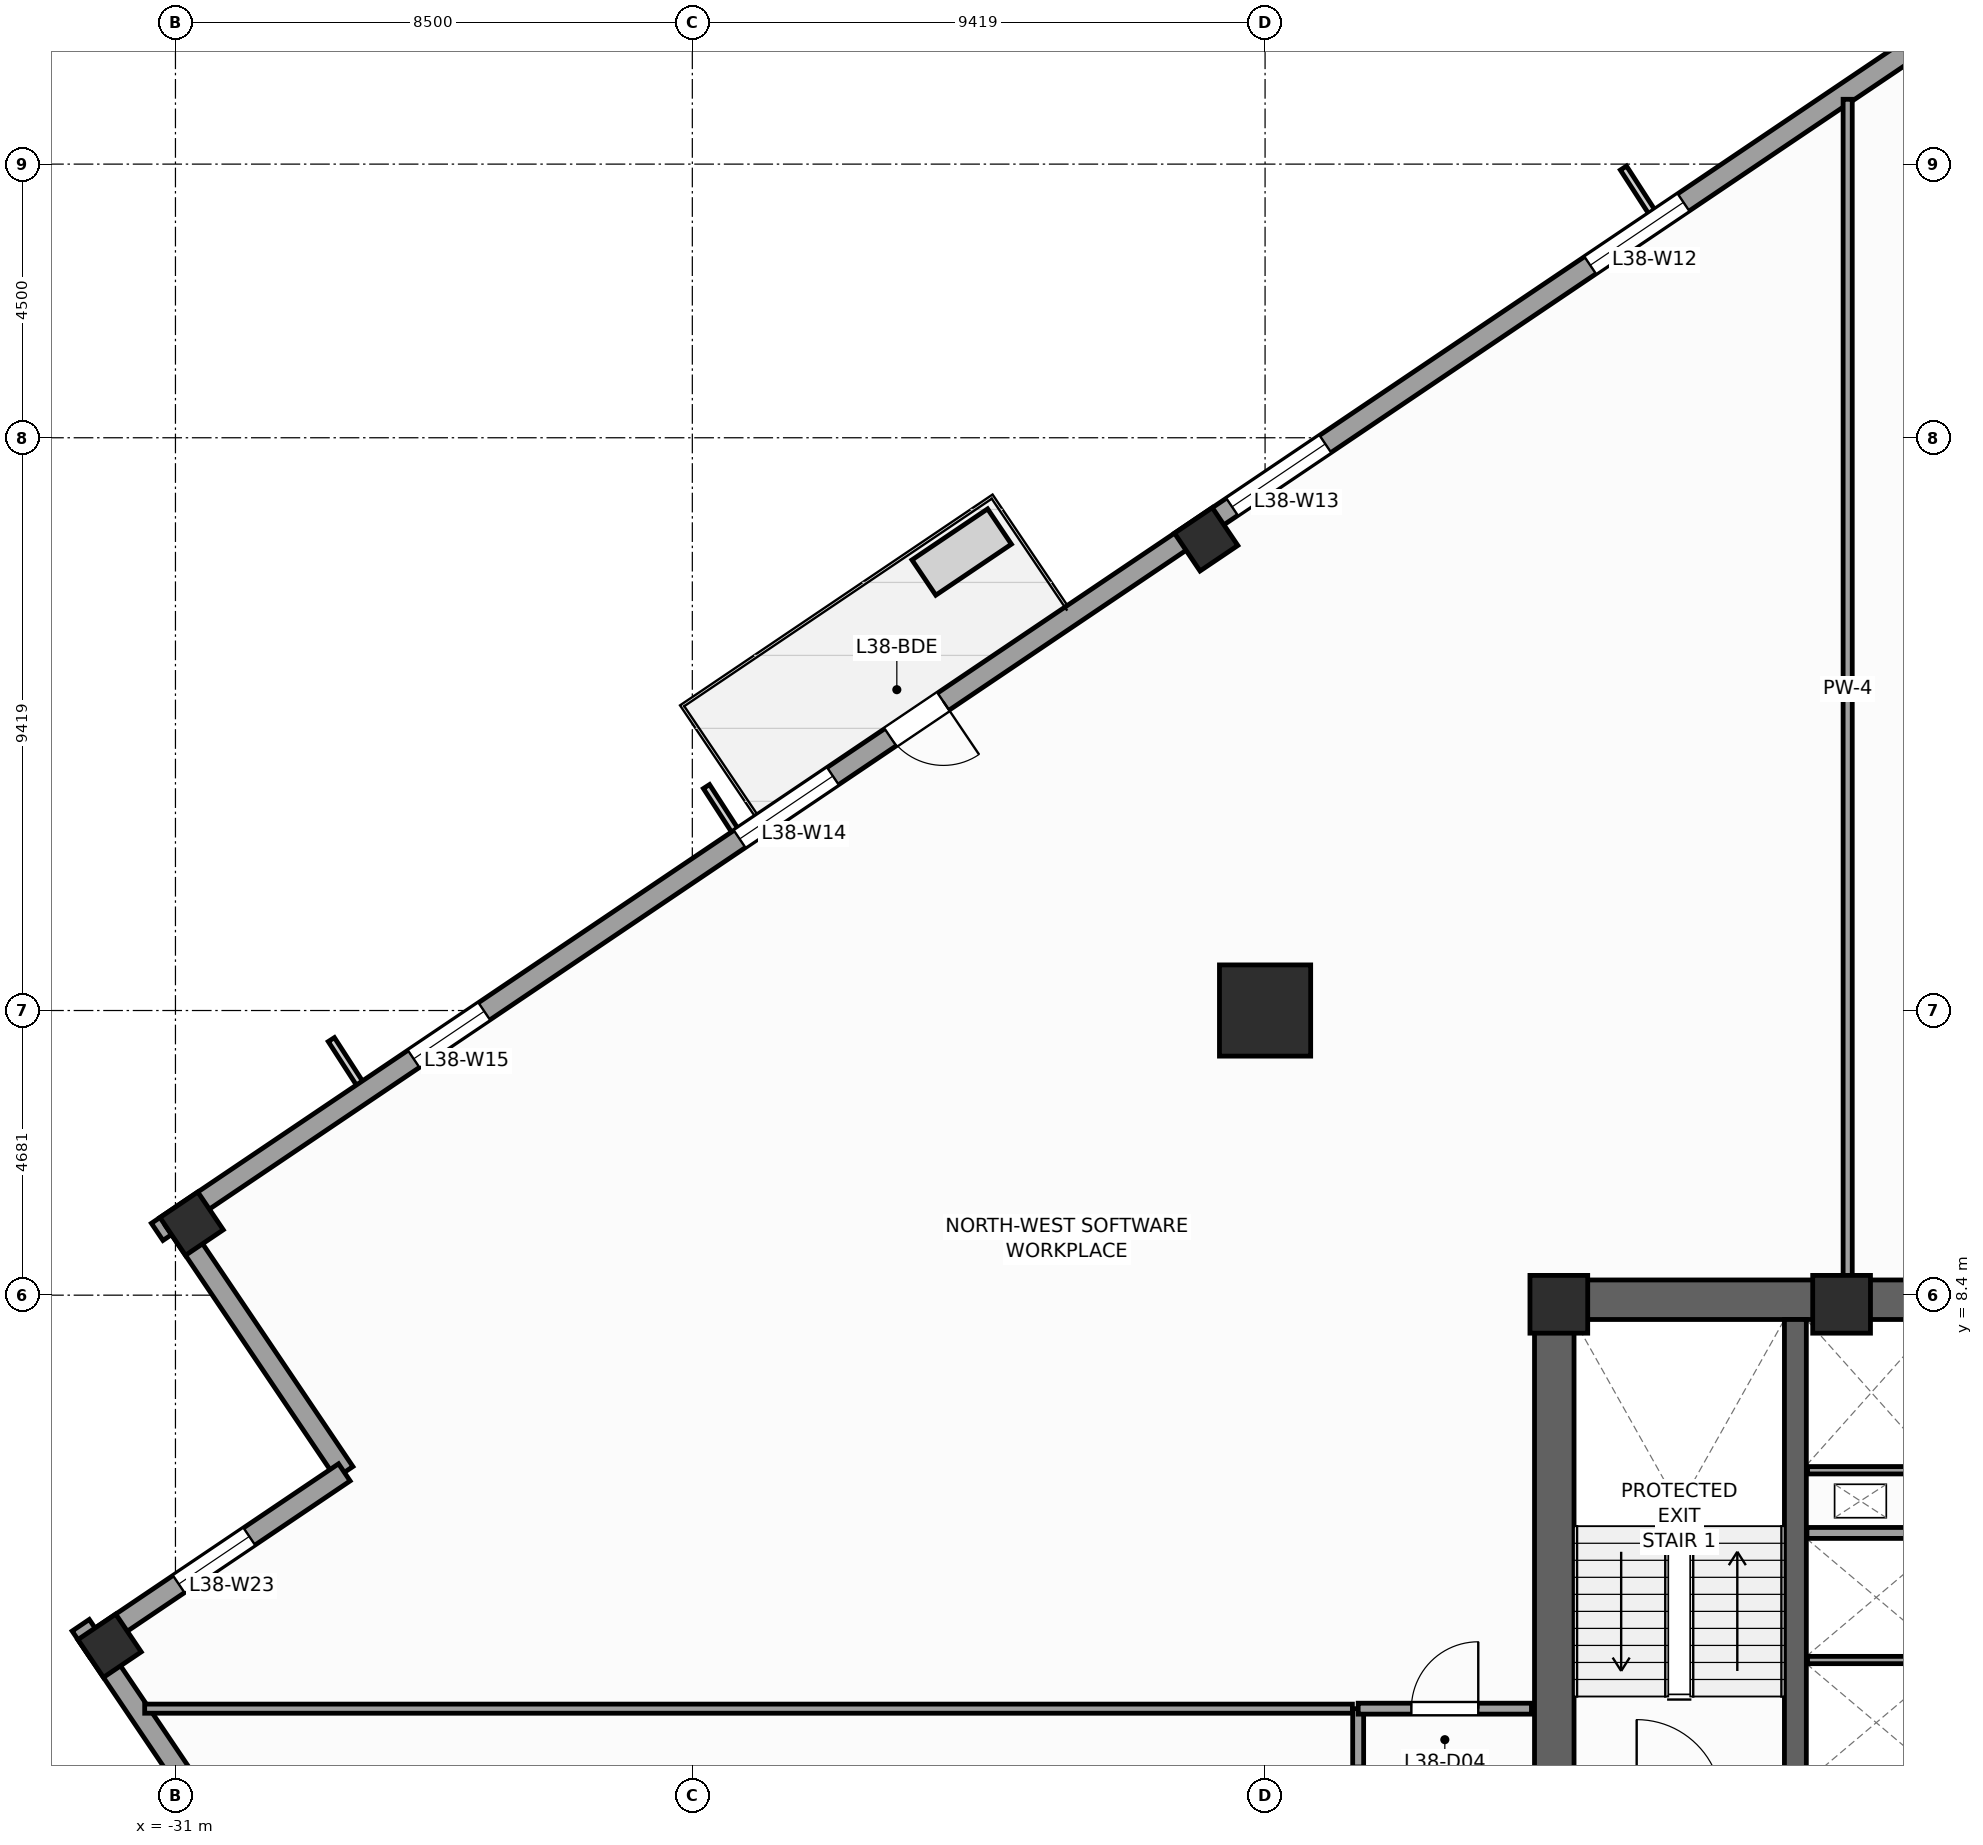
"""IFC4 building model, lengths in metres.
Left out: names, types, materials, properties, quantities, classifications, styles, units other than length and angle.
Written with IfcOpenShell. Run it as: python <this file> out.ifc"""

import sys

from ifc_helpers import new_model, si_unit, direction, frame, frame_2d, origin, origin_2d, place, context, subcontext, project, spatial, rectangle, extrude, source, transform, mapped, element, fill, save


model = new_model("IFC4")
c1 = context("Model", 3, precision=1e-05, world=origin(), true_north=direction((0.0, 1.0)))
c2 = subcontext(c1, "Body", "Model", "MODEL_VIEW")
j1 = project(units=[si_unit("LENGTHUNIT", "METRE"), si_unit("PLANEANGLEUNIT", "RADIAN")], contexts=[c1])
p1 = place(None, origin())
s1 = spatial("IfcSite", under=j1, at=p1, CompositionType="ELEMENT")
p2 = place(p1, origin())
s2 = spatial("IfcBuilding", under=s1, at=p2, CompositionType="ELEMENT")
p3 = place(p2, frame((0.0, 0.0, 160.4)))
s3 = spatial("IfcBuildingStorey", under=s2, at=p3, CompositionType="ELEMENT", Elevation=160.4)
p4 = place(p3, frame((-8.65, 8.325, 0.0), z_axis=(0.0, 0.0, 1.0), x_axis=(1.0, 0.0, 0.0)))
e1 = element("IfcWall", 1, at=p4, inside=s3, PredefinedType="SHEAR", context=c2, shape_type="SweptSolid", body=[
    extrude(rectangle(XDim=17.3, YDim=0.65, at=frame_2d((8.65, 0.0))), origin(), (0.0, 0.0, 1.0), 4.0),
])
p5 = place(p3, frame((-8.325, -8.0, 0.0), z_axis=(0.0, 0.0, 1.0), x_axis=(0.0, 1.0, 0.0)))
e2 = element("IfcWall", 2, at=p5, inside=s3, PredefinedType="SHEAR", context=c2, shape_type="SweptSolid", body=[
    extrude(rectangle(XDim=16.0, YDim=0.65, at=frame_2d((8.0, 0.0))), origin(), (0.0, 0.0, 1.0), 4.0),
])
p6 = place(p5, frame((4.69, 0.0, 0.0)))
e3 = element("IfcOpeningElement", 3, at=p6, cuts=e2, PredefinedType="OPENING", context=c2, shape_type="SweptSolid", body=[
    extrude(rectangle(XDim=1.3, YDim=2.2, at=frame_2d((0.65, 1.1))), frame((0.0, 0.335, 0.0), z_axis=(0.0, -1.0, 0.0), x_axis=(1.0, 0.0, 0.0)), (0.0, 0.0, 1.0), 0.67),
])
p7 = place(p3, frame((-4.36, -8.0, 0.0), z_axis=(0.0, 0.0, 1.0), x_axis=(0.0, 1.0, 0.0)))
e4 = element("IfcWall", 4, at=p7, inside=s3, PredefinedType="SHEAR", context=c2, shape_type="SweptSolid", body=[
    extrude(rectangle(XDim=16.0, YDim=0.36, at=frame_2d((8.0, 0.0))), origin(), (0.0, 0.0, 1.0), 4.0),
])
m1 = source(origin(), c2, "Body", "SweptSolid", [
    extrude(rectangle(XDim=0.95, YDim=0.95, at=origin_2d()), origin(), (0.0, 0.0, 1.0), 4.0),
])
for number, where, z_axis, x_axis in (
    (5, (-8.25, 8.25, 0.0), (0.0, 0.0, 1.0), (1.0, 0.0, 0.0)),
    (6, (-3.6, 8.25, 0.0), (0.0, 0.0, 1.0), (1.0, 0.0, 0.0)),
):
    element("IfcColumn", number, at=place(p3, frame(where, z_axis=z_axis, x_axis=x_axis)), inside=s3, PredefinedType="PILASTER", context=c2, shape_type="MappedRepresentation", body=[
        mapped(m1, transform((0.0, 0.0, 0.0), scale=1.0)),
    ])
m2 = source(origin(), c2, "Body", "SweptSolid", [
    extrude(rectangle(XDim=1.5, YDim=1.5, at=origin_2d()), origin(), (0.0, 0.0, 1.0), 4.0),
])
p8 = place(p3, frame((-13.081, 13.081, 0.0), z_axis=(0.0, 0.0, 1.0), x_axis=(1.0, 0.0, 0.0)))
e7 = element("IfcColumn", 7, at=p8, inside=s3, PredefinedType="COLUMN", context=c2, shape_type="MappedRepresentation", body=[
    mapped(m2, transform((0.0, 0.0, 0.0), scale=1.0)),
])
m3 = source(origin(), c2, "Body", "SweptSolid", [
    extrude(rectangle(XDim=0.75, YDim=0.75, at=origin_2d()), origin(), (0.0, 0.0, 1.0), 4.0),
])
for number, where, z_axis, x_axis in (
    (8, (-14.05, 20.83, 0.0), (0.0, 0.0, 1.0), (0.829, 0.559, 0.0)),
    (9, (-30.734, 9.576, 0.0), (0.0, 0.0, 1.0), (0.829, 0.559, 0.0)),
    (10, (-32.083, 2.635, 0.0), (0.0, 0.0, 1.0), (0.829, 0.559, 0.0)),
):
    element("IfcColumn", number, at=place(p3, frame(where, z_axis=z_axis, x_axis=x_axis)), inside=s3, PredefinedType="COLUMN", context=c2, shape_type="MappedRepresentation", body=[
        mapped(m3, transform((0.0, 0.0, 0.0), scale=1.0)),
    ])
p9 = place(p3, frame((2.972, 32.558, 0.0), z_axis=(0.0, 0.0, 1.0), x_axis=(-0.829036218961, -0.559194910251, 0.0)))
e11 = element("IfcWall", 11, at=p9, inside=s3, PredefinedType="STANDARD", context=c2, shape_type="SweptSolid", body=[
    extrude(rectangle(XDim=41.34, YDim=0.34, at=frame_2d((20.67, 0.0))), origin(), (0.0, 0.0, 1.0), 3.04),
])
p10 = place(p9, frame((25.745, 0.0, 0.0)))
e12 = element("IfcOpeningElement", 12, at=p10, cuts=e11, PredefinedType="OPENING", context=c2, shape_type="SweptSolid", body=[
    extrude(rectangle(XDim=1.05, YDim=2.25, at=frame_2d((0.525, 1.125))), frame((0.0, 0.18, 0.0), z_axis=(0.0, -1.0, 0.0), x_axis=(1.0, 0.0, 0.0)), (0.0, 0.0, 1.0), 0.36),
])
p11 = place(p9, frame((4.261, 0.0, 0.56)))
e13 = element("IfcOpeningElement", 13, at=p11, cuts=e11, PredefinedType="OPENING", context=c2, shape_type="SweptSolid", body=[
    extrude(rectangle(XDim=1.4, YDim=2.4, at=frame_2d((0.7, 1.2))), frame((0.0, 0.18, 0.0), z_axis=(0.0, -1.0, 0.0), x_axis=(1.0, 0.0, 0.0)), (0.0, 0.0, 1.0), 0.36),
])
p12 = place(p9, frame((11.064, 0.0, 0.61)))
e14 = element("IfcOpeningElement", 14, at=p12, cuts=e11, PredefinedType="OPENING", context=c2, shape_type="SweptSolid", body=[
    extrude(rectangle(XDim=1.85, YDim=2.35, at=frame_2d((0.925, 1.175))), frame((0.0, 0.18, 0.0), z_axis=(0.0, -1.0, 0.0), x_axis=(1.0, 0.0, 0.0)), (0.0, 0.0, 1.0), 0.36),
])
p13 = place(p9, frame((18.168, 0.0, 0.61)))
e15 = element("IfcOpeningElement", 15, at=p13, cuts=e11, PredefinedType="OPENING", context=c2, shape_type="SweptSolid", body=[
    extrude(rectangle(XDim=1.85, YDim=2.35, at=frame_2d((0.925, 1.175))), frame((0.0, 0.18, 0.0), z_axis=(0.0, -1.0, 0.0), x_axis=(1.0, 0.0, 0.0)), (0.0, 0.0, 1.0), 0.36),
])
p14 = place(p9, frame((27.936, 0.0, 0.61)))
e16 = element("IfcOpeningElement", 16, at=p14, cuts=e11, PredefinedType="OPENING", context=c2, shape_type="SweptSolid", body=[
    extrude(rectangle(XDim=1.85, YDim=2.35, at=frame_2d((0.925, 1.175))), frame((0.0, 0.18, 0.0), z_axis=(0.0, -1.0, 0.0), x_axis=(1.0, 0.0, 0.0)), (0.0, 0.0, 1.0), 0.36),
])
p15 = place(p9, frame((34.852, 0.0, 0.56)))
e17 = element("IfcOpeningElement", 17, at=p15, cuts=e11, PredefinedType="OPENING", context=c2, shape_type="SweptSolid", body=[
    extrude(rectangle(XDim=1.4, YDim=2.4, at=frame_2d((0.7, 1.2))), frame((0.0, 0.18, 0.0), z_axis=(0.0, -1.0, 0.0), x_axis=(1.0, 0.0, 0.0)), (0.0, 0.0, 1.0), 0.36),
])
p16 = place(p3, frame((-31.019, 9.631, 0.0), z_axis=(0.0, 0.0, 1.0), x_axis=(0.559210350234, -0.829025804298, 0.0)))
e18 = element("IfcWall", 18, at=p16, inside=s3, PredefinedType="STANDARD", context=c2, shape_type="SweptSolid", body=[
    extrude(rectangle(XDim=5.0, YDim=0.34, at=frame_2d((2.5, 0.0))), origin(), (0.0, 0.0, 1.0), 3.74),
])
p17 = place(p3, frame((-28.223, 5.486, 0.0), z_axis=(0.0, 0.0, 1.0), x_axis=(-0.82905227345, -0.559171107879, 0.0)))
e19 = element("IfcWall", 19, at=p17, inside=s3, PredefinedType="STANDARD", context=c2, shape_type="SweptSolid", body=[
    extrude(rectangle(XDim=5.17, YDim=0.34, at=frame_2d((2.585, 0.0))), origin(), (0.0, 0.0, 1.0), 3.04),
])
p18 = place(p17, frame((1.885, 0.0, 0.56)))
e20 = element("IfcOpeningElement", 20, at=p18, cuts=e19, PredefinedType="OPENING", context=c2, shape_type="SweptSolid", body=[
    extrude(rectangle(XDim=1.4, YDim=2.4, at=frame_2d((0.7, 1.2))), frame((0.0, 0.18, 0.0), z_axis=(0.0, -1.0, 0.0), x_axis=(1.0, 0.0, 0.0)), (0.0, 0.0, 1.0), 0.36),
])
p19 = place(p3, frame((-32.558, 2.972, 0.0), z_axis=(0.0, 0.0, 1.0), x_axis=(0.559194910251, -0.829036218961, 0.0)))
e21 = element("IfcWall", 21, at=p19, inside=s3, PredefinedType="STANDARD", context=c2, shape_type="SweptSolid", body=[
    extrude(rectangle(XDim=41.34, YDim=0.34, at=frame_2d((20.67, 0.0))), origin(), (0.0, 0.0, 1.0), 3.04),
])
p20 = place(p19, frame((5.761, 0.0, 0.56)))
e22 = element("IfcOpeningElement", 22, at=p20, cuts=e21, PredefinedType="OPENING", context=c2, shape_type="SweptSolid", body=[
    extrude(rectangle(XDim=1.4, YDim=2.4, at=frame_2d((0.7, 1.2))), frame((0.0, 0.18, 0.0), z_axis=(0.0, -1.0, 0.0), x_axis=(1.0, 0.0, 0.0)), (0.0, 0.0, 1.0), 0.36),
])
p21 = place(p19, frame((11.064, 0.0, 0.61)))
e23 = element("IfcOpeningElement", 23, at=p21, cuts=e21, PredefinedType="OPENING", context=c2, shape_type="SweptSolid", body=[
    extrude(rectangle(XDim=1.85, YDim=2.35, at=frame_2d((0.925, 1.175))), frame((0.0, 0.18, 0.0), z_axis=(0.0, -1.0, 0.0), x_axis=(1.0, 0.0, 0.0)), (0.0, 0.0, 1.0), 0.36),
])
p22 = place(p19, frame((18.168, 0.0, 0.61)))
e24 = element("IfcOpeningElement", 24, at=p22, cuts=e21, PredefinedType="OPENING", context=c2, shape_type="SweptSolid", body=[
    extrude(rectangle(XDim=1.85, YDim=2.35, at=frame_2d((0.925, 1.175))), frame((0.0, 0.18, 0.0), z_axis=(0.0, -1.0, 0.0), x_axis=(1.0, 0.0, 0.0)), (0.0, 0.0, 1.0), 0.36),
])
p23 = place(p19, frame((27.186, 0.0, 0.61)))
e25 = element("IfcOpeningElement", 25, at=p23, cuts=e21, PredefinedType="OPENING", context=c2, shape_type="SweptSolid", body=[
    extrude(rectangle(XDim=1.85, YDim=2.35, at=frame_2d((0.925, 1.175))), frame((0.0, 0.18, 0.0), z_axis=(0.0, -1.0, 0.0), x_axis=(1.0, 0.0, 0.0)), (0.0, 0.0, 1.0), 0.36),
])
p24 = place(p19, frame((35.602, 0.0, 0.56)))
e26 = element("IfcOpeningElement", 26, at=p24, cuts=e21, PredefinedType="OPENING", context=c2, shape_type="SweptSolid", body=[
    extrude(rectangle(XDim=1.4, YDim=2.4, at=frame_2d((0.7, 1.2))), frame((0.0, 0.18, 0.0), z_axis=(0.0, -1.0, 0.0), x_axis=(1.0, 0.0, 0.0)), (0.0, 0.0, 1.0), 0.36),
])
p25 = place(p3, frame((-4.17, 4.49, 0.0), z_axis=(0.0, 0.0, 1.0), x_axis=(1.0, 0.0, 0.0)))
e27 = element("IfcWall", 27, at=p25, inside=s3, PredefinedType="PARTITIONING", context=c2, shape_type="SweptSolid", body=[
    extrude(rectangle(XDim=2.28, YDim=0.18, at=frame_2d((1.14, 0.0))), origin(), (0.0, 0.0, 1.0), 3.74),
])
p26 = place(p3, frame((-4.16, 2.4, 0.0), z_axis=(0.0, 0.0, 1.0), x_axis=(1.0, 0.0, 0.0)))
e28 = element("IfcWall", 28, at=p26, inside=s3, PredefinedType="PARTITIONING", context=c2, shape_type="SweptSolid", body=[
    extrude(rectangle(XDim=2.26, YDim=0.12, at=frame_2d((1.13, 0.0))), origin(), (0.0, 0.0, 1.0), 3.74),
])
p27 = place(p3, frame((-4.16, 5.52, 0.0), z_axis=(0.0, 0.0, 1.0), x_axis=(1.0, 0.0, 0.0)))
e29 = element("IfcWall", 29, at=p27, inside=s3, PredefinedType="PARTITIONING", context=c2, shape_type="SweptSolid", body=[
    extrude(rectangle(XDim=2.1, YDim=0.12, at=frame_2d((1.05, 0.0))), origin(), (0.0, 0.0, 1.0), 3.74),
])
p28 = place(p3, frame((-11.55, -11.45, 0.0), z_axis=(0.0, 0.0, 1.0), x_axis=(0.0, 1.0, 0.0)))
e30 = element("IfcWall", 30, at=p28, inside=s3, PredefinedType="PARTITIONING", context=c2, shape_type="SweptSolid", body=[
    extrude(rectangle(XDim=13.05, YDim=0.18, at=frame_2d((6.525, 0.0))), origin(), (0.0, 0.0, 1.0), 3.74),
])
p29 = place(p28, frame((4.086, 0.0, 0.0)))
e31 = element("IfcOpeningElement", 31, at=p29, cuts=e30, PredefinedType="OPENING", context=c2, shape_type="SweptSolid", body=[
    extrude(rectangle(XDim=0.95, YDim=2.1, at=frame_2d((0.475, 1.05))), frame((0.0, 0.1, 0.0), z_axis=(0.0, -1.0, 0.0), x_axis=(1.0, 0.0, 0.0)), (0.0, 0.0, 1.0), 0.2),
])
p30 = place(p28, frame((11.01, 0.0, 0.0)))
e32 = element("IfcOpeningElement", 32, at=p30, cuts=e30, PredefinedType="OPENING", context=c2, shape_type="SweptSolid", body=[
    extrude(rectangle(XDim=1.1, YDim=2.2, at=frame_2d((0.55, 1.1))), frame((0.0, 0.1, 0.0), z_axis=(0.0, -1.0, 0.0), x_axis=(1.0, 0.0, 0.0)), (0.0, 0.0, 1.0), 0.2),
])
p31 = place(p28, frame((8.775, 0.0, 0.0)))
e33 = element("IfcOpeningElement", 33, at=p31, cuts=e30, PredefinedType="OPENING", context=c2, shape_type="SweptSolid", body=[
    extrude(rectangle(XDim=1.1, YDim=2.2, at=frame_2d((0.55, 1.1))), frame((0.0, 0.1, 0.0), z_axis=(0.0, -1.0, 0.0), x_axis=(1.0, 0.0, 0.0)), (0.0, 0.0, 1.0), 0.2),
])
p32 = place(p28, frame((6.35, 0.0, 0.0)))
e34 = element("IfcOpeningElement", 34, at=p32, cuts=e30, PredefinedType="OPENING", context=c2, shape_type="SweptSolid", body=[
    extrude(rectangle(XDim=1.1, YDim=2.2, at=frame_2d((0.55, 1.1))), frame((0.0, 0.1, 0.0), z_axis=(0.0, -1.0, 0.0), x_axis=(1.0, 0.0, 0.0)), (0.0, 0.0, 1.0), 0.2),
])
p33 = place(p28, frame((1.24, 0.0, 0.0)))
e35 = element("IfcOpeningElement", 35, at=p33, cuts=e30, PredefinedType="OPENING", context=c2, shape_type="SweptSolid", body=[
    extrude(rectangle(XDim=1.1, YDim=2.2, at=frame_2d((0.55, 1.1))), frame((0.0, 0.1, 0.0), z_axis=(0.0, -1.0, 0.0), x_axis=(1.0, 0.0, 0.0)), (0.0, 0.0, 1.0), 0.2),
])
p34 = place(p3, frame((-11.55, 1.6, 0.0), z_axis=(0.0, 0.0, 1.0), x_axis=(1.0, 0.0, 0.0)))
e36 = element("IfcWall", 36, at=p34, inside=s3, PredefinedType="PARTITIONING", context=c2, shape_type="SweptSolid", body=[
    extrude(rectangle(XDim=2.85, YDim=0.18, at=frame_2d((1.425, 0.0))), origin(), (0.0, 0.0, 1.0), 3.74),
])
p35 = place(p34, frame((0.875, 0.0, 0.0)))
e37 = element("IfcOpeningElement", 37, at=p35, cuts=e36, PredefinedType="OPENING", context=c2, shape_type="SweptSolid", body=[
    extrude(rectangle(XDim=1.1, YDim=2.2, at=frame_2d((0.55, 1.1))), frame((0.0, 0.1, 0.0), z_axis=(0.0, -1.0, 0.0), x_axis=(1.0, 0.0, 0.0)), (0.0, 0.0, 1.0), 0.2),
])
p36 = place(p3, frame((-3.5, 8.655, 0.0), z_axis=(0.0, 0.0, 1.0), x_axis=(0.0, 1.0, 0.0)))
e38 = element("IfcWall", 38, at=p36, inside=s3, PredefinedType="PARTITIONING", context=c2, shape_type="SweptSolid", body=[
    extrude(rectangle(XDim=19.411, YDim=0.15, at=frame_2d((9.706, 0.0))), origin(), (0.0, 0.0, 1.0), 3.74),
])
p37 = place(p3, frame((-31.506, 1.6, 0.0), z_axis=(0.0, 0.0, 1.0), x_axis=(1.0, 0.0, 0.0)))
e39 = element("IfcWall", 39, at=p37, inside=s3, PredefinedType="PARTITIONING", context=c2, shape_type="SweptSolid", body=[
    extrude(rectangle(XDim=19.861, YDim=0.15, at=frame_2d((9.931, 0.0))), origin(), (0.0, 0.0, 1.0), 3.74),
])
m4 = source(origin(), c2, "Body", "SweptSolid", [
    extrude(rectangle(XDim=1.05, YDim=2.25, at=frame_2d((0.525, 1.125))), frame((0.0, 0.025, 0.0), z_axis=(0.0, -1.0, 0.0), x_axis=(1.0, 0.0, 0.0)), (0.0, 0.0, 1.0), 0.05),
])
p38 = place(p10, origin())
e40 = element("IfcDoor", 40, at=p38, inside=s3, OperationType="SINGLE_SWING_LEFT", PredefinedType="DOOR", context=c2, shape_type="MappedRepresentation", body=[
    mapped(m4, transform((0.0, 0.0, 0.0), scale=1.0)),
])
fill(e12, e40)
m5 = source(origin(), c2, "Body", "SweptSolid", [
    extrude(rectangle(XDim=1.85, YDim=2.35, at=frame_2d((0.925, 1.175))), frame((0.0, 0.03, 0.0), z_axis=(0.0, -1.0, 0.0), x_axis=(1.0, 0.0, 0.0)), (0.0, 0.0, 1.0), 0.06),
])
p39 = place(p12, origin())
e41 = element("IfcWindow", 41, at=p39, inside=s3, PartitioningType="SINGLE_PANEL", PredefinedType="WINDOW", context=c2, shape_type="MappedRepresentation", body=[
    mapped(m5, transform((0.0, 0.0, 0.0), scale=1.0)),
])
fill(e14, e41)
p40 = place(p13, origin())
e42 = element("IfcWindow", 42, at=p40, inside=s3, PartitioningType="SINGLE_PANEL", PredefinedType="WINDOW", context=c2, shape_type="MappedRepresentation", body=[
    mapped(m5, transform((0.0, 0.0, 0.0), scale=1.0)),
])
fill(e15, e42)
p41 = place(p14, origin())
e43 = element("IfcWindow", 43, at=p41, inside=s3, PartitioningType="SINGLE_PANEL", PredefinedType="WINDOW", context=c2, shape_type="MappedRepresentation", body=[
    mapped(m5, transform((0.0, 0.0, 0.0), scale=1.0)),
])
fill(e16, e43)
m6 = source(origin(), c2, "Body", "SweptSolid", [
    extrude(rectangle(XDim=1.4, YDim=2.4, at=frame_2d((0.7, 1.2))), frame((0.0, 0.03, 0.0), z_axis=(0.0, -1.0, 0.0), x_axis=(1.0, 0.0, 0.0)), (0.0, 0.0, 1.0), 0.06),
])
p42 = place(p15, origin())
e44 = element("IfcWindow", 44, at=p42, inside=s3, PartitioningType="SINGLE_PANEL", PredefinedType="WINDOW", context=c2, shape_type="MappedRepresentation", body=[
    mapped(m6, transform((0.0, 0.0, 0.0), scale=1.0)),
])
fill(e17, e44)
p43 = place(p18, origin())
e45 = element("IfcWindow", 45, at=p43, inside=s3, PartitioningType="SINGLE_PANEL", PredefinedType="WINDOW", context=c2, shape_type="MappedRepresentation", body=[
    mapped(m6, transform((0.0, 0.0, 0.0), scale=1.0)),
])
fill(e20, e45)
m7 = source(origin(), c2, "Body", "SweptSolid", [
    extrude(rectangle(XDim=1.1, YDim=2.2, at=frame_2d((0.55, 1.1))), frame((0.0, 0.025, 0.0), z_axis=(0.0, -1.0, 0.0), x_axis=(1.0, 0.0, 0.0)), (0.0, 0.0, 1.0), 0.05),
])
p44 = place(p35, origin())
e46 = element("IfcDoor", 46, at=p44, inside=s3, OperationType="SINGLE_SWING_RIGHT", PredefinedType="DOOR", context=c2, shape_type="MappedRepresentation", body=[
    mapped(m7, transform((0.0, 0.0, 0.0), scale=1.0)),
])
fill(e37, e46)
save(model, sys.argv[1])
